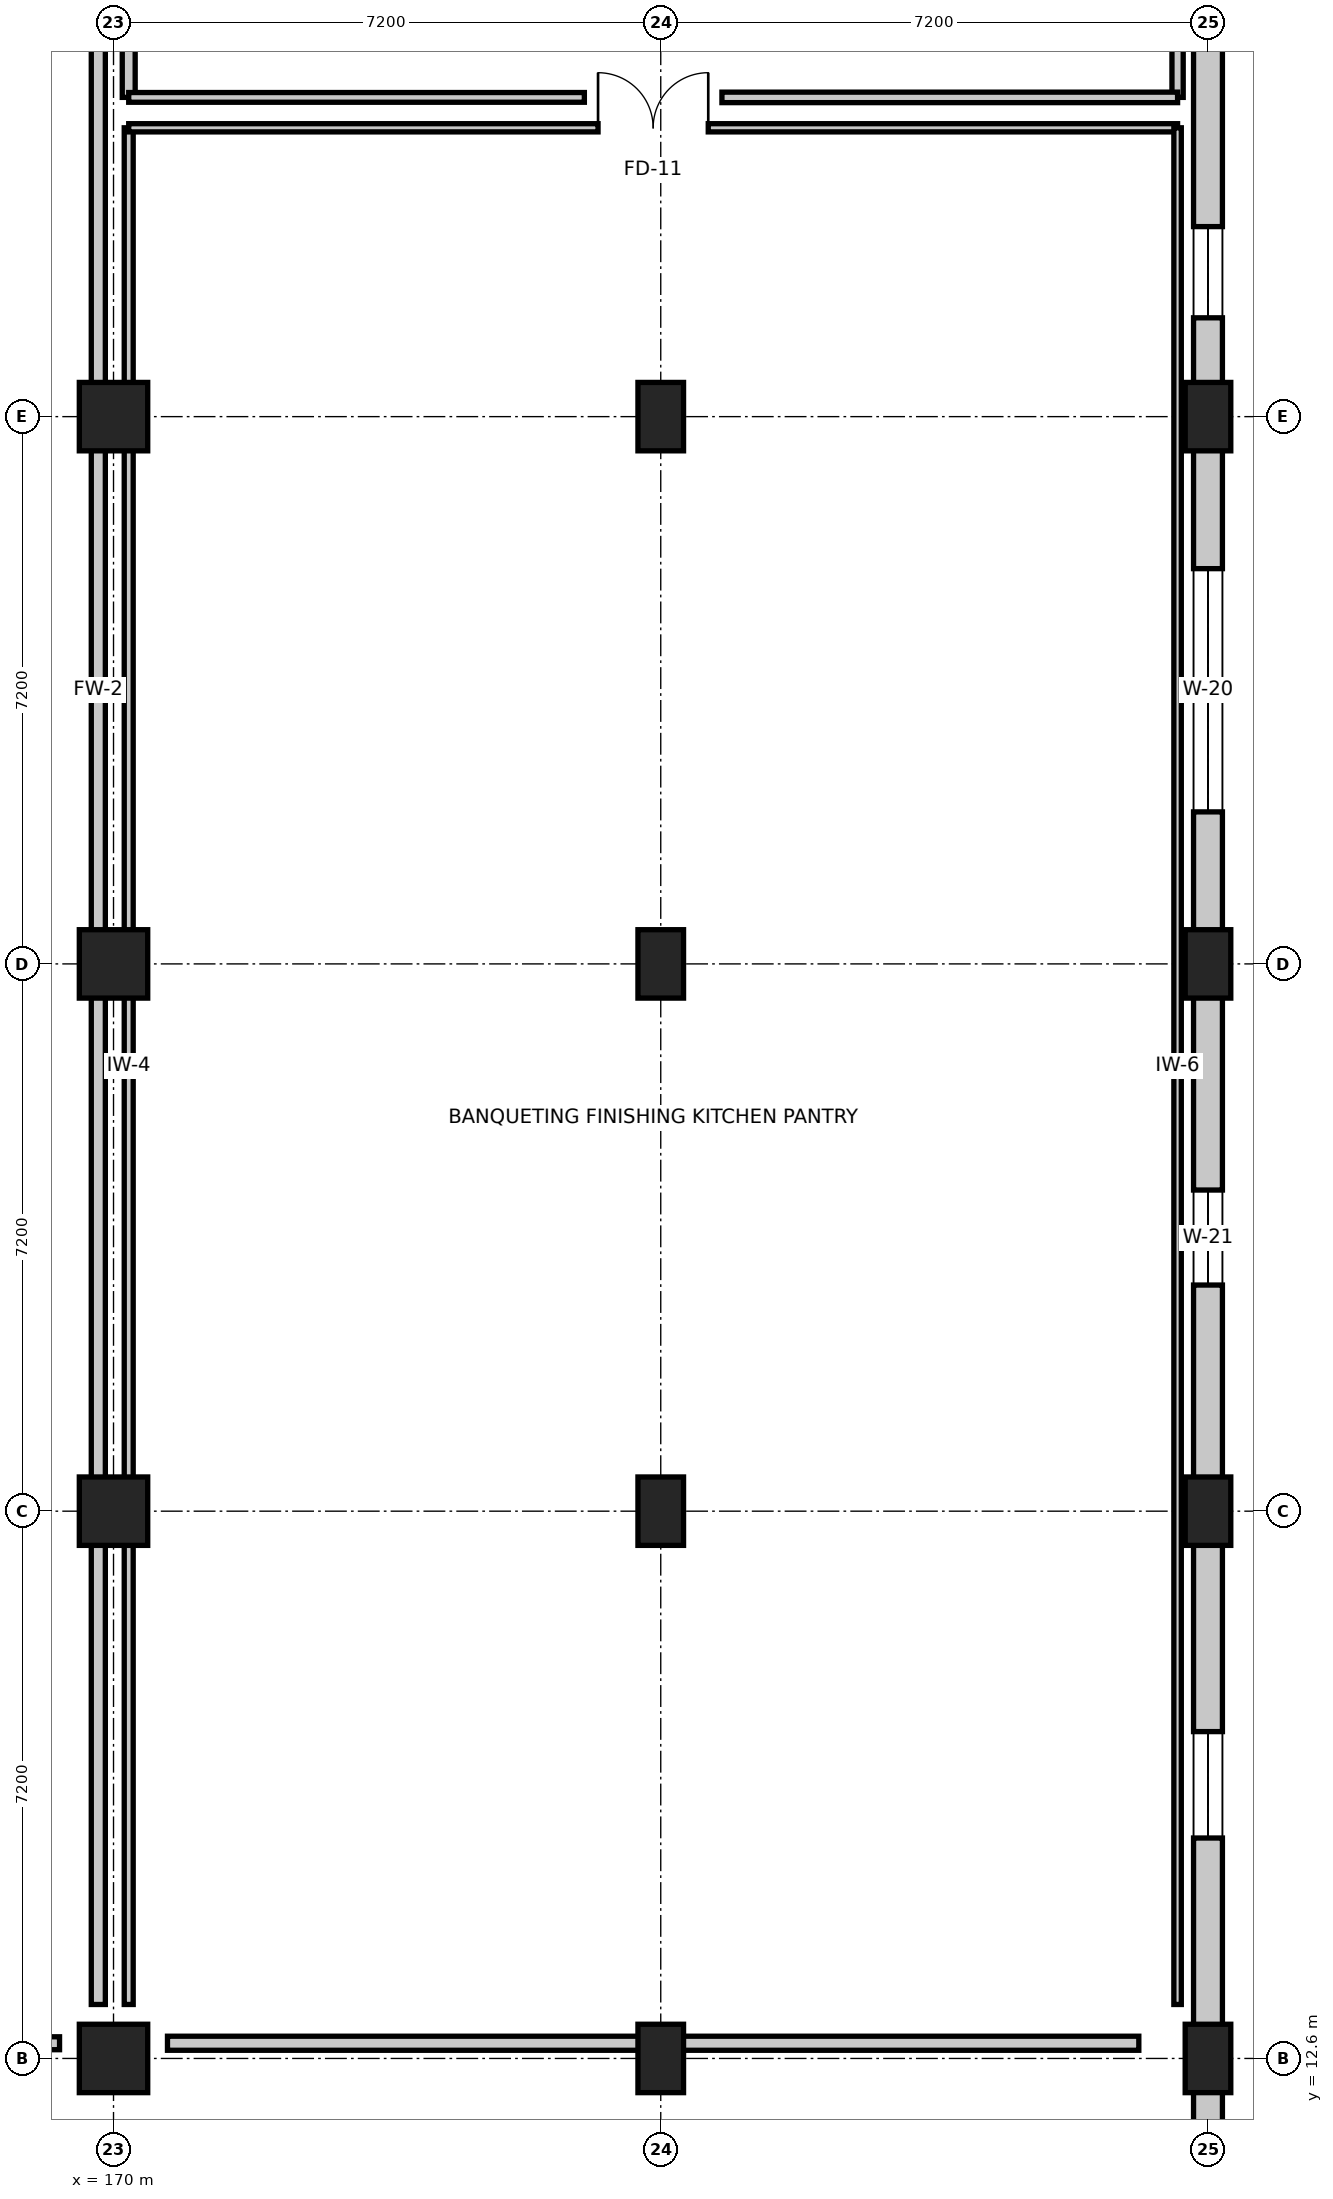
"""IFC4 building model, lengths in metres.
Left out: names, types, materials, properties, quantities, classifications, styles, units other than length and angle.
Written with IfcOpenShell. Run it as: python <this file> out.ifc"""

import sys

from ifc_helpers import new_model, si_unit, direction, frame, frame_2d, origin, origin_2d, place, context, subcontext, project, spatial, rectangle, extrude, element, fill, save


model = new_model("IFC4")
c1 = context("Model", 3, precision=1e-05, world=origin(), true_north=direction((0.0, 1.0)))
c2 = subcontext(c1, "Body", "Model", "MODEL_VIEW")
j1 = project(units=[si_unit("LENGTHUNIT", "METRE"), si_unit("PLANEANGLEUNIT", "RADIAN")], contexts=[c1])
p1 = place(None, origin())
s1 = spatial("IfcSite", under=j1, at=p1, CompositionType="ELEMENT")
p2 = place(p1, origin())
s2 = spatial("IfcBuilding", under=s1, at=p2, CompositionType="ELEMENT")
p3 = place(p2, frame((0.0, 0.0, 5.4)))
s3 = spatial("IfcBuildingStorey", under=s2, at=p3, CompositionType="ELEMENT", Elevation=5.4)
for number, where, z_axis, x_axis in (
    (1, (170.0, 12.6, 0.0), (0.0, 0.0, 1.0), (1.0, 0.0, 0.0)),
    (2, (170.0, 19.8, 0.0), (0.0, 0.0, 1.0), (1.0, 0.0, 0.0)),
    (3, (170.0, 27.0, 0.0), (0.0, 0.0, 1.0), (1.0, 0.0, 0.0)),
    (4, (170.0, 34.2, 0.0), (0.0, 0.0, 1.0), (1.0, 0.0, 0.0)),
):
    element("IfcColumn", number, at=place(p3, frame(where, z_axis=z_axis, x_axis=x_axis)), inside=s3, PredefinedType="COLUMN", context=c2, shape_type="SweptSolid", body=[
        extrude(rectangle(XDim=0.9, YDim=0.9, at=origin_2d()), origin(), (0.0, 0.0, 1.0), 5.1),
    ])
for number, where, z_axis, x_axis in (
    (5, (177.2, 12.6, 0.0), (0.0, 0.0, 1.0), (1.0, 0.0, 0.0)),
    (6, (177.2, 19.8, 0.0), (0.0, 0.0, 1.0), (1.0, 0.0, 0.0)),
    (7, (177.2, 27.0, 0.0), (0.0, 0.0, 1.0), (1.0, 0.0, 0.0)),
    (8, (177.2, 34.2, 0.0), (0.0, 0.0, 1.0), (1.0, 0.0, 0.0)),
    (9, (184.4, 12.6, 0.0), (0.0, 0.0, 1.0), (1.0, 0.0, 0.0)),
    (10, (184.4, 19.8, 0.0), (0.0, 0.0, 1.0), (1.0, 0.0, 0.0)),
    (11, (184.4, 27.0, 0.0), (0.0, 0.0, 1.0), (1.0, 0.0, 0.0)),
    (12, (184.4, 34.2, 0.0), (0.0, 0.0, 1.0), (1.0, 0.0, 0.0)),
):
    element("IfcColumn", number, at=place(p3, frame(where, z_axis=z_axis, x_axis=x_axis)), inside=s3, PredefinedType="COLUMN", context=c2, shape_type="SweptSolid", body=[
        extrude(rectangle(XDim=0.6, YDim=0.9, at=origin_2d()), origin(), (0.0, 0.0, 1.0), 5.1),
    ])
p4 = place(p3, frame((184.4, 41.4, 0.0), z_axis=(0.0, 0.0, 1.0), x_axis=(0.0, -1.0, 0.0)))
e13 = element("IfcWall", 13, at=p4, inside=s3, PredefinedType="STANDARD", context=c2, shape_type="SweptSolid", body=[
    extrude(rectangle(XDim=7.2, YDim=0.38, at=frame_2d((3.6, 0.0))), origin(), (0.0, 0.0, 1.0), 4.305),
])
p5 = place(p4, frame((0.9, 0.0, 0.9)))
e14 = element("IfcOpeningElement", 14, at=p5, cuts=e13, PredefinedType="OPENING", context=c2, shape_type="SweptSolid", body=[
    extrude(rectangle(XDim=1.2, YDim=1.8, at=frame_2d((0.6, 0.9))), frame((0.0, 0.2, 0.0), z_axis=(0.0, -1.0, 0.0), x_axis=(1.0, 0.0, 0.0)), (0.0, 0.0, 1.0), 0.4),
])
p6 = place(p4, frame((4.7, 0.0, 0.9)))
e15 = element("IfcOpeningElement", 15, at=p6, cuts=e13, PredefinedType="OPENING", context=c2, shape_type="SweptSolid", body=[
    extrude(rectangle(XDim=1.2, YDim=1.8, at=frame_2d((0.6, 0.9))), frame((0.0, 0.2, 0.0), z_axis=(0.0, -1.0, 0.0), x_axis=(1.0, 0.0, 0.0)), (0.0, 0.0, 1.0), 0.4),
])
p7 = place(p3, frame((184.4, 34.2, 0.0), z_axis=(0.0, 0.0, 1.0), x_axis=(0.0, -1.0, 0.0)))
e16 = element("IfcWall", 16, at=p7, inside=s3, PredefinedType="STANDARD", context=c2, shape_type="SweptSolid", body=[
    extrude(rectangle(XDim=7.2, YDim=0.38, at=frame_2d((3.6, 0.0))), origin(), (0.0, 0.0, 1.0), 4.305),
])
p8 = place(p7, frame((2.0, 0.0, 0.9)))
e17 = element("IfcOpeningElement", 17, at=p8, cuts=e16, PredefinedType="OPENING", context=c2, shape_type="SweptSolid", body=[
    extrude(rectangle(XDim=3.2, YDim=2.4, at=frame_2d((1.6, 1.2))), frame((0.0, 0.2, 0.0), z_axis=(0.0, -1.0, 0.0), x_axis=(1.0, 0.0, 0.0)), (0.0, 0.0, 1.0), 0.4),
])
p9 = place(p3, frame((184.4, 27.0, 0.0), z_axis=(0.0, 0.0, 1.0), x_axis=(0.0, -1.0, 0.0)))
e18 = element("IfcWall", 18, at=p9, inside=s3, PredefinedType="STANDARD", context=c2, shape_type="SweptSolid", body=[
    extrude(rectangle(XDim=7.2, YDim=0.38, at=frame_2d((3.6, 0.0))), origin(), (0.0, 0.0, 1.0), 4.305),
])
p10 = place(p9, frame((2.975, 0.0, 0.9)))
e19 = element("IfcOpeningElement", 19, at=p10, cuts=e18, PredefinedType="OPENING", context=c2, shape_type="SweptSolid", body=[
    extrude(rectangle(XDim=1.25, YDim=1.75, at=frame_2d((0.625, 0.875))), frame((0.0, 0.2, 0.0), z_axis=(0.0, -1.0, 0.0), x_axis=(1.0, 0.0, 0.0)), (0.0, 0.0, 1.0), 0.4),
])
p11 = place(p3, frame((184.4, 19.8, 0.0), z_axis=(0.0, 0.0, 1.0), x_axis=(0.0, -1.0, 0.0)))
e20 = element("IfcWall", 20, at=p11, inside=s3, PredefinedType="STANDARD", context=c2, shape_type="SweptSolid", body=[
    extrude(rectangle(XDim=7.2, YDim=0.38, at=frame_2d((3.6, 0.0))), origin(), (0.0, 0.0, 1.0), 4.305),
])
p12 = place(p11, frame((2.9, 0.0, 0.9)))
e21 = element("IfcOpeningElement", 21, at=p12, cuts=e20, PredefinedType="OPENING", context=c2, shape_type="SweptSolid", body=[
    extrude(rectangle(XDim=1.4, YDim=1.75, at=frame_2d((0.7, 0.875))), frame((0.0, 0.2, 0.0), z_axis=(0.0, -1.0, 0.0), x_axis=(1.0, 0.0, 0.0)), (0.0, 0.0, 1.0), 0.4),
])
p13 = place(p3, frame((184.4, 12.6, 0.0), z_axis=(0.0, 0.0, 1.0), x_axis=(0.0, -1.0, 0.0)))
e22 = element("IfcWall", 22, at=p13, inside=s3, PredefinedType="STANDARD", context=c2, shape_type="SweptSolid", body=[
    extrude(rectangle(XDim=7.2, YDim=0.38, at=frame_2d((3.6, 0.0))), origin(), (0.0, 0.0, 1.0), 4.305),
])
p14 = place(p13, frame((2.825, 0.0, 0.9)))
e23 = element("IfcOpeningElement", 23, at=p14, cuts=e22, PredefinedType="OPENING", context=c2, shape_type="SweptSolid", body=[
    extrude(rectangle(XDim=1.55, YDim=1.75, at=frame_2d((0.775, 0.875))), frame((0.0, 0.2, 0.0), z_axis=(0.0, -1.0, 0.0), x_axis=(1.0, 0.0, 0.0)), (0.0, 0.0, 1.0), 0.4),
])
p15 = place(p3, frame((169.8, 47.89, 0.0), z_axis=(0.0, 0.0, 1.0), x_axis=(0.0, -1.0, 0.0)))
e24 = element("IfcWall", 24, at=p15, inside=s3, PredefinedType="PARTITIONING", context=c2, shape_type="SweptSolid", body=[
    extrude(rectangle(XDim=34.58, YDim=0.185, at=frame_2d((17.29, 0.0))), origin(), (0.0, 0.0, 1.0), 4.229),
])
p16 = place(p3, frame((169.29, 12.8, 0.0), z_axis=(0.0, 0.0, 1.0), x_axis=(-1.0, 0.0, 0.0)))
e25 = element("IfcWall", 25, at=p16, inside=s3, PredefinedType="PARTITIONING", context=c2, shape_type="SweptSolid", body=[
    extrude(rectangle(XDim=27.38, YDim=0.17, at=frame_2d((13.69, 0.0))), origin(), (0.0, 0.0, 1.0), 4.153),
])
p17 = place(p3, frame((170.2, 13.31, 0.0), z_axis=(0.0, 0.0, 1.0), x_axis=(0.0, 1.0, 0.0)))
e26 = element("IfcWall", 26, at=p17, inside=s3, PredefinedType="PARTITIONING", context=c2, shape_type="SweptSolid", body=[
    extrude(rectangle(XDim=24.69, YDim=0.118, at=frame_2d((12.345, 0.0))), origin(), (0.0, 0.0, 1.0), 4.229),
])
p18 = place(p3, frame((170.2, 38.0, 0.0), z_axis=(0.0, 0.0, 1.0), x_axis=(1.0, 0.0, 0.0)))
e27 = element("IfcWall", 27, at=p18, inside=s3, PredefinedType="PARTITIONING", context=c2, shape_type="SweptSolid", body=[
    extrude(rectangle(XDim=13.8, YDim=0.108, at=frame_2d((6.9, 0.0))), origin(), (0.0, 0.0, 1.0), 4.229),
])
p19 = place(p18, frame((6.175, 0.0, 0.0)))
e28 = element("IfcOpeningElement", 28, at=p19, cuts=e27, PredefinedType="OPENING", context=c2, shape_type="SweptSolid", body=[
    extrude(rectangle(XDim=1.45, YDim=2.2, at=frame_2d((0.725, 1.1))), frame((0.0, 0.064, 0.0), z_axis=(0.0, -1.0, 0.0), x_axis=(1.0, 0.0, 0.0)), (0.0, 0.0, 1.0), 0.128),
])
p20 = place(p3, frame((184.0, 38.0, 0.0), z_axis=(0.0, 0.0, 1.0), x_axis=(0.0, -1.0, 0.0)))
e29 = element("IfcWall", 29, at=p20, inside=s3, PredefinedType="PARTITIONING", context=c2, shape_type="SweptSolid", body=[
    extrude(rectangle(XDim=24.69, YDim=0.098, at=frame_2d((12.345, 0.0))), origin(), (0.0, 0.0, 1.0), 4.153),
])
p21 = place(p3, frame((183.49, 12.8, 0.0), z_axis=(0.0, 0.0, 1.0), x_axis=(-1.0, 0.0, 0.0)))
e30 = element("IfcWall", 30, at=p21, inside=s3, PredefinedType="PARTITIONING", context=c2, shape_type="SweptSolid", body=[
    extrude(rectangle(XDim=12.78, YDim=0.185, at=frame_2d((6.39, 0.0))), origin(), (0.0, 0.0, 1.0), 4.153),
])
p22 = place(p3, frame((170.2, 38.4, 0.0), z_axis=(0.0, 0.0, 1.0), x_axis=(0.0, 1.0, 0.0)))
e31 = element("IfcWall", 31, at=p22, inside=s3, PredefinedType="PARTITIONING", context=c2, shape_type="SweptSolid", body=[
    extrude(rectangle(XDim=11.0, YDim=0.17, at=frame_2d((5.5, 0.0))), origin(), (0.0, 0.0, 1.0), 4.229),
])
p23 = place(p3, frame((184.0, 49.4, 0.0), z_axis=(0.0, 0.0, 1.0), x_axis=(0.0, -1.0, 0.0)))
e32 = element("IfcWall", 32, at=p23, inside=s3, PredefinedType="PARTITIONING", context=c2, shape_type="SweptSolid", body=[
    extrude(rectangle(XDim=11.0, YDim=0.148, at=frame_2d((5.5, 0.0))), origin(), (0.0, 0.0, 1.0), 4.153),
])
p24 = place(p3, frame((184.0, 38.4, 0.0), z_axis=(0.0, 0.0, 1.0), x_axis=(-1.0, 0.0, 0.0)))
e33 = element("IfcWall", 33, at=p24, inside=s3, PredefinedType="PARTITIONING", context=c2, shape_type="SweptSolid", body=[
    extrude(rectangle(XDim=5.995, YDim=0.138, at=frame_2d((2.998, 0.0))), origin(), (0.0, 0.0, 1.0), 4.78),
])
p25 = place(p3, frame((176.195, 38.4, 0.0), z_axis=(0.0, 0.0, 1.0), x_axis=(-1.0, 0.0, 0.0)))
e34 = element("IfcWall", 34, at=p25, inside=s3, PredefinedType="PARTITIONING", context=c2, shape_type="SweptSolid", body=[
    extrude(rectangle(XDim=5.995, YDim=0.128, at=frame_2d((2.998, 0.0))), origin(), (0.0, 0.0, 1.0), 4.78),
])
p26 = place(p8, origin())
e35 = element("IfcWindow", 35, at=p26, inside=s3, PartitioningType="SINGLE_PANEL", PredefinedType="WINDOW", context=c2, shape_type="SweptSolid", body=[
    extrude(rectangle(XDim=3.2, YDim=2.4, at=frame_2d((1.6, 1.2))), frame((0.0, 0.03, 0.0), z_axis=(0.0, -1.0, 0.0), x_axis=(1.0, 0.0, 0.0)), (0.0, 0.0, 1.0), 0.06),
])
fill(e17, e35)
p27 = place(p10, origin())
e36 = element("IfcWindow", 36, at=p27, inside=s3, PartitioningType="SINGLE_PANEL", PredefinedType="WINDOW", context=c2, shape_type="SweptSolid", body=[
    extrude(rectangle(XDim=1.25, YDim=1.75, at=frame_2d((0.625, 0.875))), frame((0.0, 0.03, 0.0), z_axis=(0.0, -1.0, 0.0), x_axis=(1.0, 0.0, 0.0)), (0.0, 0.0, 1.0), 0.06),
])
fill(e19, e36)
p28 = place(p12, origin())
e37 = element("IfcWindow", 37, at=p28, inside=s3, PartitioningType="SINGLE_PANEL", PredefinedType="WINDOW", context=c2, shape_type="SweptSolid", body=[
    extrude(rectangle(XDim=1.4, YDim=1.75, at=frame_2d((0.7, 0.875))), frame((0.0, 0.03, 0.0), z_axis=(0.0, -1.0, 0.0), x_axis=(1.0, 0.0, 0.0)), (0.0, 0.0, 1.0), 0.06),
])
fill(e21, e37)
p29 = place(p19, origin())
e38 = element("IfcDoor", 38, at=p29, inside=s3, OperationType="DOUBLE_DOOR_SINGLE_SWING", PredefinedType="DOOR", context=c2, shape_type="SweptSolid", body=[
    extrude(rectangle(XDim=1.45, YDim=2.2, at=frame_2d((0.725, 1.1))), frame((0.0, 0.025, 0.0), z_axis=(0.0, -1.0, 0.0), x_axis=(1.0, 0.0, 0.0)), (0.0, 0.0, 1.0), 0.05),
])
fill(e28, e38)
p30 = place(p6, origin())
e39 = element("IfcWindow", 39, at=p30, inside=s3, PartitioningType="SINGLE_PANEL", PredefinedType="WINDOW", context=c2, shape_type="SweptSolid", body=[
    extrude(rectangle(XDim=1.2, YDim=1.8, at=frame_2d((0.6, 0.9))), frame((0.0, 0.03, 0.0), z_axis=(0.0, -1.0, 0.0), x_axis=(1.0, 0.0, 0.0)), (0.0, 0.0, 1.0), 0.06),
])
fill(e15, e39)
save(model, sys.argv[1])
